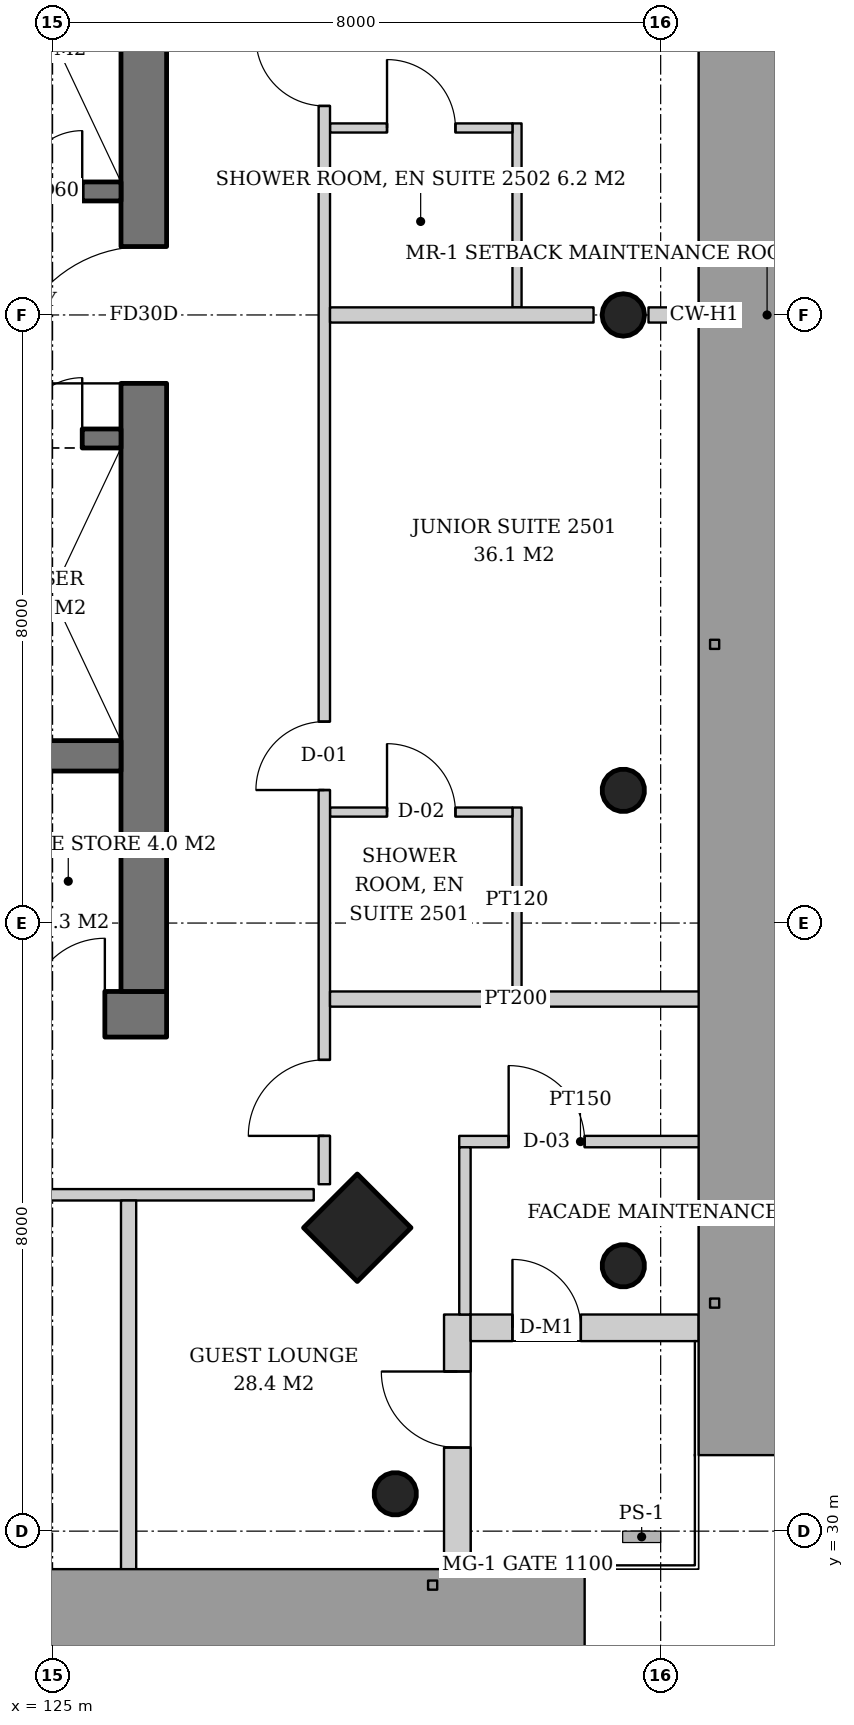
"""IFC4 building model, lengths in metres.
Left out: names, types, materials, properties, quantities, classifications, styles, units other than length and angle.
Written with IfcOpenShell. Run it as: python <this file> out.ifc"""

import sys

from ifc_helpers import new_model, si_unit, direction, frame, frame_2d, origin, origin_2d, place, context, subcontext, project, spatial, rectangle, hollow_circle, extrude, element, fill, save


model = new_model("IFC4")
c1 = context("Model", 3, precision=1e-05, world=origin(), true_north=direction((0.0, 1.0)))
c2 = subcontext(c1, "Body", "Model", "MODEL_VIEW")
j1 = project(units=[si_unit("LENGTHUNIT", "METRE"), si_unit("PLANEANGLEUNIT", "RADIAN")], contexts=[c1])
p1 = place(None, origin())
s1 = spatial("IfcSite", under=j1, at=p1, CompositionType="ELEMENT")
p2 = place(p1, origin())
s2 = spatial("IfcBuilding", under=s1, at=p2, CompositionType="ELEMENT")
p3 = place(p2, frame((0.0, 0.0, 100.8)))
s3 = spatial("IfcBuildingStorey", under=s2, at=p3, CompositionType="ELEMENT", Elevation=100.8)
p4 = place(p3, frame((132.56, 33.44, 0.0), z_axis=(-0.043029647111, 0.043029647111, 0.998146732169), x_axis=(-0.707106781187, -0.707106781187, 0.0)))
e1 = element("IfcColumn", 1, at=p4, inside=s3, PredefinedType="COLUMN", context=c2, shape_type="SweptSolid", body=[
    extrude(hollow_circle(Radius=0.28, WallThickness=0.02, at=origin_2d()), origin(), (0.0, 0.0, 1.0), 3.807),
])
p5 = place(p3, frame((132.56, 39.72, 0.0), z_axis=(-0.043059525333, 0.021561848751, 0.998839808957), x_axis=(-0.44774654769, -0.894160516368, 0.0)))
e2 = element("IfcColumn", 2, at=p5, inside=s3, PredefinedType="COLUMN", context=c2, shape_type="SweptSolid", body=[
    extrude(hollow_circle(Radius=0.28, WallThickness=0.02, at=origin_2d()), origin(), (0.0, 0.0, 1.0), 3.804),
])
p6 = place(p3, frame((132.56, 46.0, 0.0), z_axis=(-0.043069538298, 0.0, 0.999072076915), x_axis=(0.0, -1.0, 0.0)))
e3 = element("IfcColumn", 3, at=p6, inside=s3, PredefinedType="COLUMN", context=c2, shape_type="SweptSolid", body=[
    extrude(hollow_circle(Radius=0.28, WallThickness=0.02, at=origin_2d()), origin(), (0.0, 0.0, 1.0), 3.803),
])
p7 = place(p3, frame((129.06, 33.94, 0.0), z_axis=(-0.043029647111, 0.043029647111, 0.998146732169), x_axis=(-0.707106781187, -0.707106781187, 0.0)))
e4 = element("IfcColumn", 4, at=p7, inside=s3, PredefinedType="COLUMN", context=c2, shape_type="SweptSolid", body=[
    extrude(rectangle(XDim=1.0, YDim=1.0, at=origin_2d()), origin(), (0.0, 0.0, 1.0), 3.807),
])
p8 = place(p3, frame((129.56, 30.44, 0.0), z_axis=(-0.043029647111, 0.043029647111, 0.998146732169), x_axis=(-0.707106781187, -0.707106781187, 0.0)))
e5 = element("IfcColumn", 5, at=p8, inside=s3, PredefinedType="COLUMN", context=c2, shape_type="SweptSolid", body=[
    extrude(hollow_circle(Radius=0.28, WallThickness=0.02, at=origin_2d()), origin(), (0.0, 0.0, 1.0), 3.807),
])
p9 = place(p3, frame((107.5, 36.8, 0.0), z_axis=(0.0, 0.0, 1.0), x_axis=(1.0, 0.0, 0.0)))
e6 = element("IfcWall", 6, at=p9, inside=s3, PredefinedType="SHEAR", context=c2, shape_type="SweptSolid", body=[
    extrude(rectangle(XDim=19.0, YDim=0.6, at=frame_2d((9.5, 0.0))), origin(), (0.0, 0.0, 1.0), 3.8),
])
p10 = place(p9, frame((3.9, 0.0, 0.0)))
e7 = element("IfcOpeningElement", 7, at=p10, cuts=e6, PredefinedType="OPENING", context=c2, shape_type="SweptSolid", body=[
    extrude(rectangle(XDim=1.0, YDim=2.1, at=frame_2d((0.5, 1.05))), frame((0.0, 0.31, 0.0), z_axis=(0.0, -1.0, 0.0), x_axis=(1.0, 0.0, 0.0)), (0.0, 0.0, 1.0), 0.62),
])
p11 = place(p9, frame((14.08, 0.0, 0.0)))
e8 = element("IfcOpeningElement", 8, at=p11, cuts=e6, PredefinedType="OPENING", context=c2, shape_type="SweptSolid", body=[
    extrude(rectangle(XDim=1.0, YDim=2.1, at=frame_2d((0.5, 1.05))), frame((0.0, 0.31, 0.0), z_axis=(0.0, -1.0, 0.0), x_axis=(1.0, 0.0, 0.0)), (0.0, 0.0, 1.0), 0.62),
])
p12 = place(p9, frame((15.615, 0.0, 0.0)))
e9 = element("IfcOpeningElement", 9, at=p12, cuts=e6, PredefinedType="OPENING", context=c2, shape_type="SweptSolid", body=[
    extrude(rectangle(XDim=1.0, YDim=2.1, at=frame_2d((0.5, 1.05))), frame((0.0, 0.31, 0.0), z_axis=(0.0, -1.0, 0.0), x_axis=(1.0, 0.0, 0.0)), (0.0, 0.0, 1.0), 0.62),
])
p13 = place(p9, frame((17.188, 0.0, 0.0)))
e10 = element("IfcOpeningElement", 10, at=p13, cuts=e6, PredefinedType="OPENING", context=c2, shape_type="SweptSolid", body=[
    extrude(rectangle(XDim=1.0, YDim=2.1, at=frame_2d((0.5, 1.05))), frame((0.0, 0.31, 0.0), z_axis=(0.0, -1.0, 0.0), x_axis=(1.0, 0.0, 0.0)), (0.0, 0.0, 1.0), 0.62),
])
p14 = place(p3, frame((126.2, 37.1, 0.0), z_axis=(0.0, 0.0, 1.0), x_axis=(0.0, 1.0, 0.0)))
e11 = element("IfcWall", 11, at=p14, inside=s3, PredefinedType="SHEAR", context=c2, shape_type="SweptSolid", body=[
    extrude(rectangle(XDim=17.8, YDim=0.6, at=frame_2d((8.9, 0.0))), origin(), (0.0, 0.0, 1.0), 3.8),
])
p15 = place(p14, frame((8.0, 0.0, 0.0)))
e12 = element("IfcOpeningElement", 12, at=p15, cuts=e11, PredefinedType="OPENING", context=c2, shape_type="SweptSolid", body=[
    extrude(rectangle(XDim=1.8, YDim=2.4, at=frame_2d((0.9, 1.2))), frame((0.0, 0.31, 0.0), z_axis=(0.0, -1.0, 0.0), x_axis=(1.0, 0.0, 0.0)), (0.0, 0.0, 1.0), 0.62),
])
p16 = place(p3, frame((108.1, 40.2, 0.0), z_axis=(0.0, 0.0, 1.0), x_axis=(1.0, 0.0, 0.0)))
e13 = element("IfcWall", 13, at=p16, inside=s3, PredefinedType="SHEAR", context=c2, shape_type="SweptSolid", body=[
    extrude(rectangle(XDim=17.8, YDim=0.4, at=frame_2d((8.9, 0.0))), origin(), (0.0, 0.0, 1.0), 3.8),
])
p17 = place(p3, frame((130.325, 29.5, 0.0), z_axis=(0.0, 0.0, 1.0), x_axis=(0.0, 1.0, 0.0)))
e14 = element("IfcWall", 14, at=p17, inside=s3, PredefinedType="SOLIDWALL", context=c2, shape_type="SweptSolid", body=[
    extrude(rectangle(XDim=3.35, YDim=0.35, at=frame_2d((1.675, 0.0))), origin(), (0.0, 0.0, 1.0), 3.6),
])
p18 = place(p17, frame((1.6, 0.0, 0.0)))
e15 = element("IfcOpeningElement", 15, at=p18, cuts=e14, PredefinedType="OPENING", context=c2, shape_type="SweptSolid", body=[
    extrude(rectangle(XDim=1.0, YDim=2.4, at=frame_2d((0.5, 1.2))), frame((0.0, 0.185, 0.0), z_axis=(0.0, -1.0, 0.0), x_axis=(1.0, 0.0, 0.0)), (0.0, 0.0, 1.0), 0.37),
])
p19 = place(p3, frame((130.5, 32.675, 0.0), z_axis=(0.0, 0.0, 1.0), x_axis=(1.0, 0.0, 0.0)))
e16 = element("IfcWall", 16, at=p19, inside=s3, PredefinedType="SOLIDWALL", context=c2, shape_type="SweptSolid", body=[
    extrude(rectangle(XDim=3.0, YDim=0.35, at=frame_2d((1.5, 0.0))), origin(), (0.0, 0.0, 1.0), 3.6),
])
p20 = place(p19, frame((0.55, 0.0, 0.0)))
e17 = element("IfcOpeningElement", 17, at=p20, cuts=e16, PredefinedType="OPENING", context=c2, shape_type="SweptSolid", body=[
    extrude(rectangle(XDim=0.9, YDim=2.1, at=frame_2d((0.45, 1.05))), frame((0.0, 0.185, 0.0), z_axis=(0.0, -1.0, 0.0), x_axis=(1.0, 0.0, 0.0)), (0.0, 0.0, 1.0), 0.37),
])
p21 = place(p3, frame((121.33, 47.625, 0.0), z_axis=(0.0, 0.0, 1.0), x_axis=(1.0, 0.0, 0.0)))
e18 = element("IfcWall", 18, at=p21, inside=s3, PredefinedType="SHEAR", context=c2, shape_type="SweptSolid", body=[
    extrude(rectangle(XDim=4.57, YDim=0.25, at=frame_2d((2.285, 0.0))), origin(), (0.0, 0.0, 1.0), 3.8),
])
p22 = place(p21, frame((0.55, 0.0, 0.0)))
e19 = element("IfcOpeningElement", 19, at=p22, cuts=e18, PredefinedType="OPENING", context=c2, shape_type="SweptSolid", body=[
    extrude(rectangle(XDim=1.4, YDim=2.4, at=frame_2d((0.7, 1.2))), frame((0.0, 0.135, 0.0), z_axis=(0.0, -1.0, 0.0), x_axis=(1.0, 0.0, 0.0)), (0.0, 0.0, 1.0), 0.27),
])
p23 = place(p21, frame((3.26, 0.0, 0.0)))
e20 = element("IfcOpeningElement", 20, at=p23, cuts=e18, PredefinedType="OPENING", context=c2, shape_type="SweptSolid", body=[
    extrude(rectangle(XDim=0.8, YDim=2.0, at=frame_2d((0.4, 1.0))), frame((0.0, 0.135, 0.0), z_axis=(0.0, -1.0, 0.0), x_axis=(1.0, 0.0, 0.0)), (0.0, 0.0, 1.0), 0.27),
])
p24 = place(p3, frame((121.33, 44.375, 0.0), z_axis=(0.0, 0.0, 1.0), x_axis=(1.0, 0.0, 0.0)))
e21 = element("IfcWall", 21, at=p24, inside=s3, PredefinedType="SHEAR", context=c2, shape_type="SweptSolid", body=[
    extrude(rectangle(XDim=4.57, YDim=0.25, at=frame_2d((2.285, 0.0))), origin(), (0.0, 0.0, 1.0), 3.8),
])
p25 = place(p24, frame((0.55, 0.0, 0.0)))
e22 = element("IfcOpeningElement", 22, at=p25, cuts=e21, PredefinedType="OPENING", context=c2, shape_type="SweptSolid", body=[
    extrude(rectangle(XDim=1.4, YDim=2.4, at=frame_2d((0.7, 1.2))), frame((0.0, 0.135, 0.0), z_axis=(0.0, -1.0, 0.0), x_axis=(1.0, 0.0, 0.0)), (0.0, 0.0, 1.0), 0.27),
])
p26 = place(p24, frame((3.26, 0.0, 0.0)))
e23 = element("IfcOpeningElement", 23, at=p26, cuts=e21, PredefinedType="OPENING", context=c2, shape_type="SweptSolid", body=[
    extrude(rectangle(XDim=0.8, YDim=2.0, at=frame_2d((0.4, 1.0))), frame((0.0, 0.135, 0.0), z_axis=(0.0, -1.0, 0.0), x_axis=(1.0, 0.0, 0.0)), (0.0, 0.0, 1.0), 0.27),
])
p27 = place(p3, frame((131.11, 37.1, 0.0), z_axis=(0.0, 0.0, 1.0), x_axis=(0.0, 1.0, 0.0)))
e24 = element("IfcWall", 24, at=p27, inside=s3, PredefinedType="PARTITIONING", context=c2, shape_type="SweptSolid", body=[
    extrude(rectangle(XDim=2.42, YDim=0.12, at=frame_2d((1.21, 0.0))), origin(), (0.0, 0.0, 1.0), 3.6),
])
p28 = place(p3, frame((128.65, 39.46, 0.0), z_axis=(0.0, 0.0, 1.0), x_axis=(1.0, 0.0, 0.0)))
e25 = element("IfcWall", 25, at=p28, inside=s3, PredefinedType="PARTITIONING", context=c2, shape_type="SweptSolid", body=[
    extrude(rectangle(XDim=2.4, YDim=0.12, at=frame_2d((1.2, 0.0))), origin(), (0.0, 0.0, 1.0), 3.6),
])
p29 = place(p28, frame((0.75, 0.0, 0.0)))
e26 = element("IfcOpeningElement", 26, at=p29, cuts=e25, PredefinedType="OPENING", context=c2, shape_type="SweptSolid", body=[
    extrude(rectangle(XDim=0.9, YDim=2.1, at=frame_2d((0.45, 1.05))), frame((0.0, 0.07, 0.0), z_axis=(0.0, -1.0, 0.0), x_axis=(1.0, 0.0, 0.0)), (0.0, 0.0, 1.0), 0.14),
])
p30 = place(p3, frame((131.11, 46.1, 0.0), z_axis=(0.0, 0.0, 1.0), x_axis=(0.0, 1.0, 0.0)))
e27 = element("IfcWall", 27, at=p30, inside=s3, PredefinedType="PARTITIONING", context=c2, shape_type="SweptSolid", body=[
    extrude(rectangle(XDim=2.42, YDim=0.12, at=frame_2d((1.21, 0.0))), origin(), (0.0, 0.0, 1.0), 3.6),
])
p31 = place(p3, frame((128.65, 48.46, 0.0), z_axis=(0.0, 0.0, 1.0), x_axis=(1.0, 0.0, 0.0)))
e28 = element("IfcWall", 28, at=p31, inside=s3, PredefinedType="PARTITIONING", context=c2, shape_type="SweptSolid", body=[
    extrude(rectangle(XDim=2.4, YDim=0.12, at=frame_2d((1.2, 0.0))), origin(), (0.0, 0.0, 1.0), 3.6),
])
p32 = place(p31, frame((0.75, 0.0, 0.0)))
e29 = element("IfcOpeningElement", 29, at=p32, cuts=e28, PredefinedType="OPENING", context=c2, shape_type="SweptSolid", body=[
    extrude(rectangle(XDim=0.9, YDim=2.1, at=frame_2d((0.45, 1.05))), frame((0.0, 0.07, 0.0), z_axis=(0.0, -1.0, 0.0), x_axis=(1.0, 0.0, 0.0)), (0.0, 0.0, 1.0), 0.14),
])
p33 = place(p3, frame((128.575, 34.564, 0.0), z_axis=(0.0, 0.0, 1.0), x_axis=(0.0, 1.0, 0.0)))
e30 = element("IfcWall", 30, at=p33, inside=s3, PredefinedType="PARTITIONING", context=c2, shape_type="SweptSolid", body=[
    extrude(rectangle(XDim=22.872, YDim=0.15, at=frame_2d((11.436, 0.0))), origin(), (0.0, 0.0, 1.0), 2.9),
])
p34 = place(p33, frame((0.636, 0.0, 0.0)))
e31 = element("IfcOpeningElement", 31, at=p34, cuts=e30, PredefinedType="OPENING", context=c2, shape_type="SweptSolid", body=[
    extrude(rectangle(XDim=1.0, YDim=2.1, at=frame_2d((0.5, 1.05))), frame((0.0, 0.085, 0.0), z_axis=(0.0, -1.0, 0.0), x_axis=(1.0, 0.0, 0.0)), (0.0, 0.0, 1.0), 0.17),
])
p35 = place(p33, frame((5.186, 0.0, 0.0)))
e32 = element("IfcOpeningElement", 32, at=p35, cuts=e30, PredefinedType="OPENING", context=c2, shape_type="SweptSolid", body=[
    extrude(rectangle(XDim=0.9, YDim=2.1, at=frame_2d((0.45, 1.05))), frame((0.0, 0.085, 0.0), z_axis=(0.0, -1.0, 0.0), x_axis=(1.0, 0.0, 0.0)), (0.0, 0.0, 1.0), 0.17),
])
p36 = place(p33, frame((14.186, 0.0, 0.0)))
e33 = element("IfcOpeningElement", 33, at=p36, cuts=e30, PredefinedType="OPENING", context=c2, shape_type="SweptSolid", body=[
    extrude(rectangle(XDim=0.9, YDim=2.1, at=frame_2d((0.45, 1.05))), frame((0.0, 0.085, 0.0), z_axis=(0.0, -1.0, 0.0), x_axis=(1.0, 0.0, 0.0)), (0.0, 0.0, 1.0), 0.17),
])
p37 = place(p3, frame((128.65, 37.0, 0.0), z_axis=(0.0, 0.0, 1.0), x_axis=(1.0, 0.0, 0.0)))
e34 = element("IfcWall", 34, at=p37, inside=s3, PredefinedType="PARTITIONING", context=c2, shape_type="SweptSolid", body=[
    extrude(rectangle(XDim=4.89, YDim=0.2, at=frame_2d((2.445, 0.0))), origin(), (0.0, 0.0, 1.0), 2.9),
])
p38 = place(p3, frame((128.65, 46.0, 0.0), z_axis=(0.0, 0.0, 1.0), x_axis=(1.0, 0.0, 0.0)))
e35 = element("IfcWall", 35, at=p38, inside=s3, PredefinedType="PARTITIONING", context=c2, shape_type="SweptSolid", body=[
    extrude(rectangle(XDim=3.467, YDim=0.2, at=frame_2d((1.733, 0.0))), origin(), (0.0, 0.0, 1.0), 3.6),
])
p39 = place(p3, frame((132.84, 46.0, 0.0), z_axis=(0.0, 0.0, 1.0), x_axis=(1.0, 0.0, 0.0)))
e36 = element("IfcWall", 36, at=p39, inside=s3, PredefinedType="PARTITIONING", context=c2, shape_type="SweptSolid", body=[
    extrude(rectangle(XDim=0.7, YDim=0.2, at=frame_2d((0.35, 0.0))), origin(), (0.0, 0.0, 1.0), 3.6),
])
p40 = place(p3, frame((105.564, 34.425, 0.0), z_axis=(0.0, 0.0, 1.0), x_axis=(1.0, 0.0, 0.0)))
e37 = element("IfcWall", 37, at=p40, inside=s3, PredefinedType="PARTITIONING", context=c2, shape_type="SweptSolid", body=[
    extrude(rectangle(XDim=22.872, YDim=0.15, at=frame_2d((11.436, 0.0))), origin(), (0.0, 0.0, 1.0), 2.9),
])
p41 = place(p40, frame((0.686, 0.0, 0.0)))
e38 = element("IfcOpeningElement", 38, at=p41, cuts=e37, PredefinedType="OPENING", context=c2, shape_type="SweptSolid", body=[
    extrude(rectangle(XDim=0.9, YDim=2.1, at=frame_2d((0.45, 1.05))), frame((0.0, 0.085, 0.0), z_axis=(0.0, -1.0, 0.0), x_axis=(1.0, 0.0, 0.0)), (0.0, 0.0, 1.0), 0.17),
])
p42 = place(p40, frame((5.186, 0.0, 0.0)))
e39 = element("IfcOpeningElement", 39, at=p42, cuts=e37, PredefinedType="OPENING", context=c2, shape_type="SweptSolid", body=[
    extrude(rectangle(XDim=0.9, YDim=2.1, at=frame_2d((0.45, 1.05))), frame((0.0, 0.085, 0.0), z_axis=(0.0, -1.0, 0.0), x_axis=(1.0, 0.0, 0.0)), (0.0, 0.0, 1.0), 0.17),
])
p43 = place(p40, frame((14.136, 0.0, 0.0)))
e40 = element("IfcOpeningElement", 40, at=p43, cuts=e37, PredefinedType="OPENING", context=c2, shape_type="SweptSolid", body=[
    extrude(rectangle(XDim=1.0, YDim=2.1, at=frame_2d((0.5, 1.05))), frame((0.0, 0.085, 0.0), z_axis=(0.0, -1.0, 0.0), x_axis=(1.0, 0.0, 0.0)), (0.0, 0.0, 1.0), 0.17),
])
p44 = place(p3, frame((126.0, 34.35, 0.0), z_axis=(0.0, 0.0, 1.0), x_axis=(0.0, -1.0, 0.0)))
e41 = element("IfcWall", 41, at=p44, inside=s3, PredefinedType="PARTITIONING", context=c2, shape_type="SweptSolid", body=[
    extrude(rectangle(XDim=4.89, YDim=0.2, at=frame_2d((2.445, 0.0))), origin(), (0.0, 0.0, 1.0), 3.2),
])
p45 = place(p3, frame((130.35, 35.125, 0.0), z_axis=(0.0, 0.0, 1.0), x_axis=(1.0, 0.0, 0.0)))
e42 = element("IfcWall", 42, at=p45, inside=s3, PredefinedType="PARTITIONING", context=c2, shape_type="SweptSolid", body=[
    extrude(rectangle(XDim=3.19, YDim=0.15, at=frame_2d((1.595, 0.0))), origin(), (0.0, 0.0, 1.0), 3.2),
])
p46 = place(p45, frame((0.65, 0.0, 0.0)))
e43 = element("IfcOpeningElement", 43, at=p46, cuts=e42, PredefinedType="OPENING", context=c2, shape_type="SweptSolid", body=[
    extrude(rectangle(XDim=1.0, YDim=2.1, at=frame_2d((0.5, 1.05))), frame((0.0, 0.085, 0.0), z_axis=(0.0, -1.0, 0.0), x_axis=(1.0, 0.0, 0.0)), (0.0, 0.0, 1.0), 0.17),
])
p47 = place(p3, frame((130.425, 35.05, 0.0), z_axis=(0.0, 0.0, 1.0), x_axis=(0.0, -1.0, 0.0)))
e44 = element("IfcWall", 44, at=p47, inside=s3, PredefinedType="PARTITIONING", context=c2, shape_type="SweptSolid", body=[
    extrude(rectangle(XDim=2.2, YDim=0.15, at=frame_2d((1.1, 0.0))), origin(), (0.0, 0.0, 1.0), 3.2),
])
p48 = place(p20, origin())
e45 = element("IfcDoor", 45, at=p48, inside=s3, OperationType="SINGLE_SWING_LEFT", PredefinedType="DOOR", context=c2, shape_type="SweptSolid", body=[
    extrude(rectangle(XDim=0.9, YDim=2.1, at=frame_2d((0.45, 1.05))), frame((0.0, 0.025, 0.0), z_axis=(0.0, -1.0, 0.0), x_axis=(1.0, 0.0, 0.0)), (0.0, 0.0, 1.0), 0.05),
])
fill(e17, e45)
p49 = place(p18, origin())
e46 = element("IfcDoor", 46, at=p49, inside=s3, OperationType="SINGLE_SWING_RIGHT", PredefinedType="DOOR", context=c2, shape_type="SweptSolid", body=[
    extrude(rectangle(XDim=1.0, YDim=2.4, at=frame_2d((0.5, 1.2))), frame((0.0, 0.025, 0.0), z_axis=(0.0, -1.0, 0.0), x_axis=(1.0, 0.0, 0.0)), (0.0, 0.0, 1.0), 0.05),
])
fill(e15, e46)
p50 = place(p23, origin())
e47 = element("IfcDoor", 47, at=p50, inside=s3, OperationType="SINGLE_SWING_RIGHT", PredefinedType="DOOR", context=c2, shape_type="SweptSolid", body=[
    extrude(rectangle(XDim=0.8, YDim=2.0, at=frame_2d((0.4, 1.0))), frame((0.0, 0.025, 0.0), z_axis=(0.0, -1.0, 0.0), x_axis=(1.0, 0.0, 0.0)), (0.0, 0.0, 1.0), 0.05),
])
fill(e20, e47)
p51 = place(p26, origin())
e48 = element("IfcDoor", 48, at=p51, inside=s3, OperationType="SINGLE_SWING_RIGHT", PredefinedType="DOOR", context=c2, shape_type="SweptSolid", body=[
    extrude(rectangle(XDim=0.8, YDim=2.0, at=frame_2d((0.4, 1.0))), frame((0.0, 0.025, 0.0), z_axis=(0.0, -1.0, 0.0), x_axis=(1.0, 0.0, 0.0)), (0.0, 0.0, 1.0), 0.05),
])
fill(e23, e48)
p52 = place(p15, origin())
e49 = element("IfcDoor", 49, at=p52, inside=s3, OperationType="DOUBLE_DOOR_SINGLE_SWING", PredefinedType="DOOR", context=c2, shape_type="SweptSolid", body=[
    extrude(rectangle(XDim=1.8, YDim=2.4, at=frame_2d((0.9, 1.2))), frame((0.0, 0.025, 0.0), z_axis=(0.0, -1.0, 0.0), x_axis=(1.0, 0.0, 0.0)), (0.0, 0.0, 1.0), 0.05),
])
fill(e12, e49)
p53 = place(p13, origin())
e50 = element("IfcDoor", 50, at=p53, inside=s3, OperationType="SINGLE_SWING_RIGHT", PredefinedType="DOOR", context=c2, shape_type="SweptSolid", body=[
    extrude(rectangle(XDim=1.0, YDim=2.1, at=frame_2d((0.5, 1.05))), frame((0.0, 0.29, 0.0), z_axis=(0.0, -1.0, 0.0), x_axis=(1.0, 0.0, 0.0)), (0.0, 0.0, 1.0), 0.05),
])
fill(e10, e50)
p54 = place(p29, origin())
e51 = element("IfcDoor", 51, at=p54, inside=s3, OperationType="SINGLE_SWING_LEFT", PredefinedType="DOOR", context=c2, shape_type="SweptSolid", body=[
    extrude(rectangle(XDim=0.9, YDim=2.1, at=frame_2d((0.45, 1.05))), frame((0.0, 0.025, 0.0), z_axis=(0.0, -1.0, 0.0), x_axis=(1.0, 0.0, 0.0)), (0.0, 0.0, 1.0), 0.05),
])
fill(e26, e51)
p55 = place(p32, origin())
e52 = element("IfcDoor", 52, at=p55, inside=s3, OperationType="SINGLE_SWING_LEFT", PredefinedType="DOOR", context=c2, shape_type="SweptSolid", body=[
    extrude(rectangle(XDim=0.9, YDim=2.1, at=frame_2d((0.45, 1.05))), frame((0.0, 0.025, 0.0), z_axis=(0.0, -1.0, 0.0), x_axis=(1.0, 0.0, 0.0)), (0.0, 0.0, 1.0), 0.05),
])
fill(e29, e52)
p56 = place(p34, origin())
e53 = element("IfcDoor", 53, at=p56, inside=s3, OperationType="SINGLE_SWING_LEFT", PredefinedType="DOOR", context=c2, shape_type="SweptSolid", body=[
    extrude(rectangle(XDim=1.0, YDim=2.1, at=frame_2d((0.5, 1.05))), frame((0.0, 0.025, 0.0), z_axis=(0.0, -1.0, 0.0), x_axis=(1.0, 0.0, 0.0)), (0.0, 0.0, 1.0), 0.05),
])
fill(e31, e53)
p57 = place(p35, origin())
e54 = element("IfcDoor", 54, at=p57, inside=s3, OperationType="SINGLE_SWING_LEFT", PredefinedType="DOOR", context=c2, shape_type="SweptSolid", body=[
    extrude(rectangle(XDim=0.9, YDim=2.1, at=frame_2d((0.45, 1.05))), frame((0.0, 0.025, 0.0), z_axis=(0.0, -1.0, 0.0), x_axis=(1.0, 0.0, 0.0)), (0.0, 0.0, 1.0), 0.05),
])
fill(e32, e54)
p58 = place(p36, origin())
e55 = element("IfcDoor", 55, at=p58, inside=s3, OperationType="SINGLE_SWING_RIGHT", PredefinedType="DOOR", context=c2, shape_type="SweptSolid", body=[
    extrude(rectangle(XDim=0.9, YDim=2.1, at=frame_2d((0.45, 1.05))), frame((0.0, 0.025, 0.0), z_axis=(0.0, -1.0, 0.0), x_axis=(1.0, 0.0, 0.0)), (0.0, 0.0, 1.0), 0.05),
])
fill(e33, e55)
p59 = place(p46, origin())
e56 = element("IfcDoor", 56, at=p59, inside=s3, OperationType="SINGLE_SWING_LEFT", PredefinedType="DOOR", context=c2, shape_type="SweptSolid", body=[
    extrude(rectangle(XDim=1.0, YDim=2.1, at=frame_2d((0.5, 1.05))), frame((0.0, 0.025, 0.0), z_axis=(0.0, -1.0, 0.0), x_axis=(1.0, 0.0, 0.0)), (0.0, 0.0, 1.0), 0.05),
])
fill(e43, e56)
save(model, sys.argv[1])
